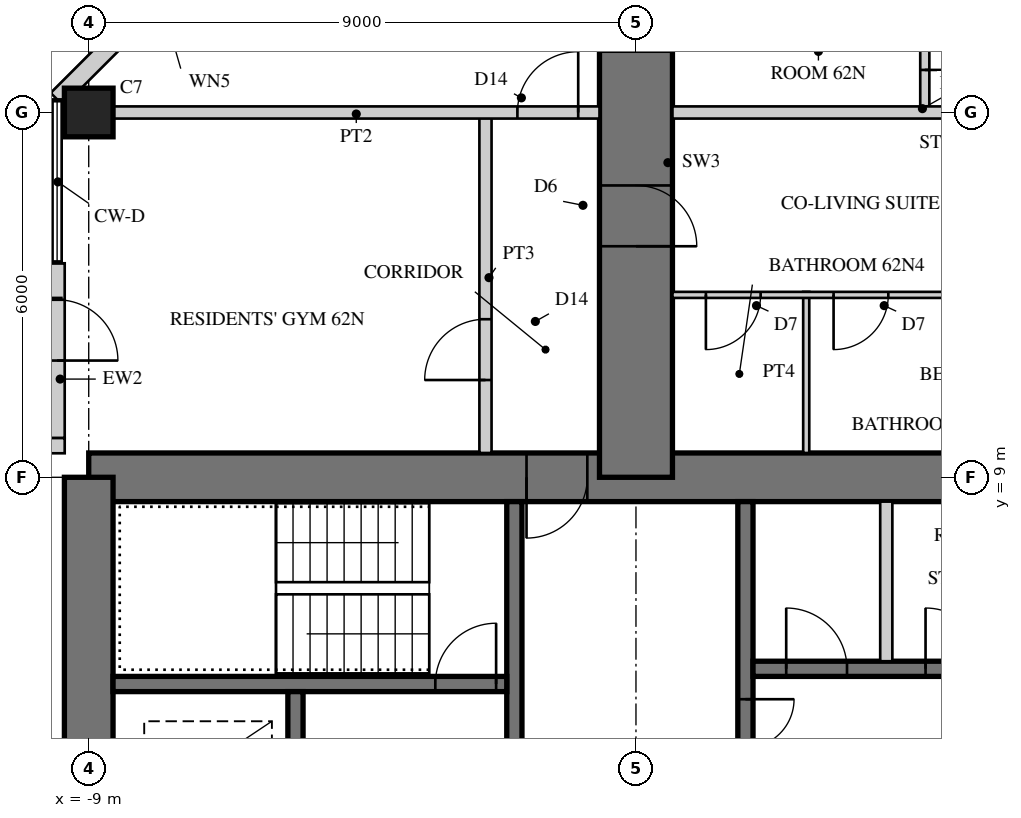
"""IFC4 building model, lengths in metres.
Left out: names, types, materials, properties, quantities, classifications, styles, units other than length and angle.
Written with IfcOpenShell. Run it as: python <this file> out.ifc"""

import sys

from ifc_helpers import new_model, si_unit, direction, frame, frame_2d, origin, origin_2d, place, context, subcontext, project, spatial, rectangle, hollow_rectangle, extrude, element, fill, save


model = new_model("IFC4")
c1 = context("Model", 3, precision=1e-05, world=origin(), true_north=direction((0.0, 1.0)))
c2 = subcontext(c1, "Body", "Model", "MODEL_VIEW")
j1 = project(units=[si_unit("LENGTHUNIT", "METRE"), si_unit("PLANEANGLEUNIT", "RADIAN")], contexts=[c1])
p1 = place(None, origin())
s1 = spatial("IfcSite", under=j1, at=p1, CompositionType="ELEMENT")
p2 = place(p1, origin())
s2 = spatial("IfcBuilding", under=s1, at=p2, CompositionType="ELEMENT")
p3 = place(p2, frame((0.0, 0.0, 242.5)))
s3 = spatial("IfcBuildingStorey", under=s2, at=p3, CompositionType="ELEMENT", Elevation=242.5)
p4 = place(p3, frame((9.0, 9.0, 0.0), z_axis=(0.0, 0.0, 1.0), x_axis=(-1.0, 0.0, 0.0)))
e1 = element("IfcWall", 1, at=p4, inside=s3, PredefinedType="SHEAR", context=c2, shape_type="SweptSolid", body=[
    extrude(rectangle(XDim=18.0, YDim=0.8, at=frame_2d((9.0, 0.0))), origin(), (0.0, 0.0, 1.0), 3.4),
])
p5 = place(p4, frame((9.8, 0.0, 0.0)))
e2 = element("IfcOpeningElement", 2, at=p5, cuts=e1, PredefinedType="OPENING", context=c2, shape_type="SweptSolid", body=[
    extrude(rectangle(XDim=1.0, YDim=2.4, at=frame_2d((0.5, 1.2))), frame((0.0, 0.41, 0.0), z_axis=(0.0, -1.0, 0.0), x_axis=(1.0, 0.0, 0.0)), (0.0, 0.0, 1.0), 0.82),
])
p6 = place(p3, frame((-9.0, 9.0, 0.0), z_axis=(0.0, 0.0, 1.0), x_axis=(0.0, -1.0, 0.0)))
e3 = element("IfcWall", 3, at=p6, inside=s3, PredefinedType="SHEAR", context=c2, shape_type="SweptSolid", body=[
    extrude(rectangle(XDim=18.0, YDim=0.8, at=frame_2d((9.0, 0.0))), origin(), (0.0, 0.0, 1.0), 3.4),
])
p7 = place(p6, frame((9.8, 0.0, 0.0)))
e4 = element("IfcOpeningElement", 4, at=p7, cuts=e3, PredefinedType="OPENING", context=c2, shape_type="SweptSolid", body=[
    extrude(rectangle(XDim=1.0, YDim=2.4, at=frame_2d((0.5, 1.2))), frame((0.0, 0.41, 0.0), z_axis=(0.0, -1.0, 0.0), x_axis=(1.0, 0.0, 0.0)), (0.0, 0.0, 1.0), 0.82),
])
p8 = place(p3, frame((1.8, 1.875, 0.0), z_axis=(0.0, 0.0, 1.0), x_axis=(0.0, 1.0, 0.0)))
e5 = element("IfcWall", 5, at=p8, inside=s3, PredefinedType="SHEAR", context=c2, shape_type="SweptSolid", body=[
    extrude(rectangle(XDim=6.725, YDim=0.25, at=frame_2d((3.363, 0.0))), origin(), (0.0, 0.0, 1.0), 3.4),
])
p9 = place(p8, frame((1.875, 0.0, 0.0)))
e6 = element("IfcOpeningElement", 6, at=p9, cuts=e5, PredefinedType="OPENING", context=c2, shape_type="SweptSolid", body=[
    extrude(rectangle(XDim=1.6, YDim=2.4, at=frame_2d((0.8, 1.2))), frame((0.0, 0.135, 0.0), z_axis=(0.0, -1.0, 0.0), x_axis=(1.0, 0.0, 0.0)), (0.0, 0.0, 1.0), 0.27),
])
p10 = place(p3, frame((1.925, 5.85, 0.0), z_axis=(0.0, 0.0, 1.0), x_axis=(1.0, 0.0, 0.0)))
e7 = element("IfcWall", 7, at=p10, inside=s3, PredefinedType="SHEAR", context=c2, shape_type="SweptSolid", body=[
    extrude(rectangle(XDim=6.675, YDim=0.25, at=frame_2d((3.337, 0.0))), origin(), (0.0, 0.0, 1.0), 3.4),
])
p11 = place(p10, frame((0.546, 0.0, 0.0)))
e8 = element("IfcOpeningElement", 8, at=p11, cuts=e7, PredefinedType="OPENING", context=c2, shape_type="SweptSolid", body=[
    extrude(rectangle(XDim=1.0, YDim=2.1, at=frame_2d((0.5, 1.05))), frame((0.0, 0.135, 0.0), z_axis=(0.0, -1.0, 0.0), x_axis=(1.0, 0.0, 0.0)), (0.0, 0.0, 1.0), 0.27),
])
p12 = place(p10, frame((2.837, 0.0, 0.0)))
e9 = element("IfcOpeningElement", 9, at=p12, cuts=e7, PredefinedType="OPENING", context=c2, shape_type="SweptSolid", body=[
    extrude(rectangle(XDim=1.0, YDim=2.1, at=frame_2d((0.5, 1.05))), frame((0.0, 0.135, 0.0), z_axis=(0.0, -1.0, 0.0), x_axis=(1.0, 0.0, 0.0)), (0.0, 0.0, 1.0), 0.27),
])
p13 = place(p3, frame((4.117, 5.975, 0.0), z_axis=(0.0, 0.0, 1.0), x_axis=(0.0, 1.0, 0.0)))
e10 = element("IfcWall", 10, at=p13, inside=s3, PredefinedType="PARTITIONING", context=c2, shape_type="SweptSolid", body=[
    extrude(rectangle(XDim=2.625, YDim=0.2, at=frame_2d((1.312, 0.0))), origin(), (0.0, 0.0, 1.0), 3.4),
])
p14 = place(p3, frame((-2.0, 1.675, 0.0), z_axis=(0.0, 0.0, 1.0), x_axis=(0.0, 1.0, 0.0)))
e11 = element("IfcWall", 11, at=p14, inside=s3, PredefinedType="SHEAR", context=c2, shape_type="SweptSolid", body=[
    extrude(rectangle(XDim=6.925, YDim=0.25, at=frame_2d((3.462, 0.0))), origin(), (0.0, 0.0, 1.0), 3.4),
])
p15 = place(p14, frame((0.725, 0.0, 0.0)))
e12 = element("IfcOpeningElement", 12, at=p15, cuts=e11, PredefinedType="OPENING", context=c2, shape_type="SweptSolid", body=[
    extrude(rectangle(XDim=1.0, YDim=2.1, at=frame_2d((0.5, 1.05))), frame((0.0, 0.135, 0.0), z_axis=(0.0, -1.0, 0.0), x_axis=(1.0, 0.0, 0.0)), (0.0, 0.0, 1.0), 0.27),
])
p16 = place(p3, frame((-2.125, 5.6, 0.0), z_axis=(0.0, 0.0, 1.0), x_axis=(-1.0, 0.0, 0.0)))
e13 = element("IfcWall", 13, at=p16, inside=s3, PredefinedType="SHEAR", context=c2, shape_type="SweptSolid", body=[
    extrude(rectangle(XDim=6.475, YDim=0.25, at=frame_2d((3.238, 0.0))), origin(), (0.0, 0.0, 1.0), 3.4),
])
p17 = place(p16, frame((0.175, 0.0, 0.0)))
e14 = element("IfcOpeningElement", 14, at=p17, cuts=e13, PredefinedType="OPENING", context=c2, shape_type="SweptSolid", body=[
    extrude(rectangle(XDim=1.0, YDim=2.1, at=frame_2d((0.5, 1.05))), frame((0.0, 0.135, 0.0), z_axis=(0.0, -1.0, 0.0), x_axis=(1.0, 0.0, 0.0)), (0.0, 0.0, 1.0), 0.27),
])
p18 = place(p3, frame((-5.6, 1.925, 0.0), z_axis=(0.0, 0.0, 1.0), x_axis=(0.0, 1.0, 0.0)))
e15 = element("IfcWall", 15, at=p18, inside=s3, PredefinedType="SHEAR", context=c2, shape_type="SweptSolid", body=[
    extrude(rectangle(XDim=3.55, YDim=0.25, at=frame_2d((1.775, 0.0))), origin(), (0.0, 0.0, 1.0), 3.4),
])
p19 = place(p18, frame((1.525, 0.0, 0.0)))
e16 = element("IfcOpeningElement", 16, at=p19, cuts=e15, PredefinedType="OPENING", context=c2, shape_type="SweptSolid", body=[
    extrude(rectangle(XDim=1.1, YDim=2.2, at=frame_2d((0.55, 1.1))), frame((0.0, 0.135, 0.0), z_axis=(0.0, -1.0, 0.0), x_axis=(1.0, 0.0, 0.0)), (0.0, 0.0, 1.0), 0.27),
])
p20 = place(p18, frame((0.075, 0.0, 0.0)))
e17 = element("IfcOpeningElement", 17, at=p20, cuts=e15, PredefinedType="OPENING", context=c2, shape_type="SweptSolid", body=[
    extrude(rectangle(XDim=0.8, YDim=2.1, at=frame_2d((0.4, 1.05))), frame((0.0, 0.135, 0.0), z_axis=(0.0, -1.0, 0.0), x_axis=(1.0, 0.0, 0.0)), (0.0, 0.0, 1.0), 0.27),
])
p21 = place(p3, frame((0.0, 9.0, 0.0), z_axis=(0.0, 0.0, 1.0), x_axis=(0.0, 1.0, 0.0)))
e18 = element("IfcWall", 18, at=p21, inside=s3, PredefinedType="SHEAR", context=c2, shape_type="SweptSolid", body=[
    extrude(rectangle(XDim=9.0, YDim=1.2, at=frame_2d((4.5, 0.0))), origin(), (0.0, 0.0, 1.0), 3.4),
])
p22 = place(p21, frame((3.8, 0.0, 0.0)))
e19 = element("IfcOpeningElement", 19, at=p22, cuts=e18, PredefinedType="OPENING", context=c2, shape_type="SweptSolid", body=[
    extrude(rectangle(XDim=1.0, YDim=2.15, at=frame_2d((0.5, 1.075))), frame((0.0, 0.61, 0.0), z_axis=(0.0, -1.0, 0.0), x_axis=(1.0, 0.0, 0.0)), (0.0, 0.0, 1.0), 1.22),
])
p23 = place(p21, frame((7.0, 0.0, 0.0)))
e20 = element("IfcOpeningElement", 20, at=p23, cuts=e18, PredefinedType="OPENING", context=c2, shape_type="SweptSolid", body=[
    extrude(rectangle(XDim=1.0, YDim=2.2, at=frame_2d((0.5, 1.1))), frame((0.0, 0.61, 0.0), z_axis=(0.0, -1.0, 0.0), x_axis=(1.0, 0.0, 0.0)), (0.0, 0.0, 1.0), 1.22),
])
p24 = place(p3, frame((-9.0, 15.0, 0.0), z_axis=(0.0, 0.0, 1.0), x_axis=(1.0, 0.0, 0.0)))
e21 = element("IfcColumn", 21, at=p24, inside=s3, PredefinedType="COLUMN", context=c2, shape_type="SweptSolid", body=[
    extrude(rectangle(XDim=0.8, YDim=0.8, at=origin_2d()), origin(), (0.0, 0.0, 1.0), 3.4),
])
p25 = place(p3, frame((-6.135, 18.6, 0.0), z_axis=(0.0, 0.0, 1.0), x_axis=(-0.707081278264, -0.707132283189, 0.0)))
e22 = element("IfcWall", 22, at=p25, inside=s3, PredefinedType="SOLIDWALL", context=c2, shape_type="SweptSolid", body=[
    extrude(rectangle(XDim=4.787, YDim=0.3, at=frame_2d((2.393, 0.0))), origin(), (0.0, 0.0, 1.0), 3.22),
])
p26 = place(p25, frame((1.943, 0.0, 0.3)))
e23 = element("IfcOpeningElement", 23, at=p26, cuts=e22, PredefinedType="OPENING", context=c2, shape_type="SweptSolid", body=[
    extrude(rectangle(XDim=0.9, YDim=2.4, at=frame_2d((0.45, 1.2))), frame((0.0, 0.16, 0.0), z_axis=(0.0, -1.0, 0.0), x_axis=(1.0, 0.0, 0.0)), (0.0, 0.0, 1.0), 0.32),
])
p27 = place(p3, frame((-9.52, 12.52, 0.0), z_axis=(0.0, 0.0, 1.0), x_axis=(0.0, -1.0, 0.0)))
e24 = element("IfcWall", 24, at=p27, inside=s3, PredefinedType="SOLIDWALL", context=c2, shape_type="SweptSolid", body=[
    extrude(rectangle(XDim=2.875, YDim=0.25, at=frame_2d((1.438, 0.0))), origin(), (0.0, 0.0, 1.0), 3.22),
])
p28 = place(p27, frame((0.6, 0.0, 0.0)))
e25 = element("IfcOpeningElement", 25, at=p28, cuts=e24, PredefinedType="OPENING", context=c2, shape_type="SweptSolid", body=[
    extrude(rectangle(XDim=1.0, YDim=2.2, at=frame_2d((0.5, 1.1))), frame((0.0, 0.135, 0.0), z_axis=(0.0, -1.0, 0.0), x_axis=(1.0, 0.0, 0.0)), (0.0, 0.0, 1.0), 0.27),
])
p29 = place(p3, frame((-9.395, 9.52, 0.0), z_axis=(0.0, 0.0, 1.0), x_axis=(-1.0, 0.0, 0.0)))
e26 = element("IfcWall", 26, at=p29, inside=s3, PredefinedType="SOLIDWALL", context=c2, shape_type="SweptSolid", body=[
    extrude(rectangle(XDim=3.125, YDim=0.25, at=frame_2d((1.562, 0.0))), origin(), (0.0, 0.0, 1.0), 3.22),
])
p30 = place(p29, frame((0.6, 0.0, 0.0)))
e27 = element("IfcOpeningElement", 27, at=p30, cuts=e26, PredefinedType="OPENING", context=c2, shape_type="SweptSolid", body=[
    extrude(rectangle(XDim=1.0, YDim=2.2, at=frame_2d((0.5, 1.1))), frame((0.0, 0.135, 0.0), z_axis=(0.0, -1.0, 0.0), x_axis=(1.0, 0.0, 0.0)), (0.0, 0.0, 1.0), 0.27),
])
p31 = place(p3, frame((2.8, 9.4, 0.0), z_axis=(0.0, 0.0, 1.0), x_axis=(0.0, 1.0, 0.0)))
e28 = element("IfcWall", 28, at=p31, inside=s3, PredefinedType="PARTITIONING", context=c2, shape_type="SweptSolid", body=[
    extrude(rectangle(XDim=2.65, YDim=0.1, at=frame_2d((1.325, 0.0))), origin(), (0.0, 0.0, 1.0), 3.22),
])
p32 = place(p3, frame((9.395, 12.0, 0.0), z_axis=(0.0, 0.0, 1.0), x_axis=(-1.0, 0.0, 0.0)))
e29 = element("IfcWall", 29, at=p32, inside=s3, PredefinedType="PARTITIONING", context=c2, shape_type="SweptSolid", body=[
    extrude(rectangle(XDim=8.795, YDim=0.1, at=frame_2d((4.397, 0.0))), origin(), (0.0, 0.0, 1.0), 3.22),
])
p33 = place(p32, frame((5.245, 0.0, 0.0)))
e30 = element("IfcOpeningElement", 30, at=p33, cuts=e29, PredefinedType="OPENING", context=c2, shape_type="SweptSolid", body=[
    extrude(rectangle(XDim=0.9, YDim=2.1, at=frame_2d((0.45, 1.05))), frame((0.0, 0.06, 0.0), z_axis=(0.0, -1.0, 0.0), x_axis=(1.0, 0.0, 0.0)), (0.0, 0.0, 1.0), 0.12),
])
p34 = place(p32, frame((7.345, 0.0, 0.0)))
e31 = element("IfcOpeningElement", 31, at=p34, cuts=e29, PredefinedType="OPENING", context=c2, shape_type="SweptSolid", body=[
    extrude(rectangle(XDim=0.9, YDim=2.1, at=frame_2d((0.45, 1.05))), frame((0.0, 0.06, 0.0), z_axis=(0.0, -1.0, 0.0), x_axis=(1.0, 0.0, 0.0)), (0.0, 0.0, 1.0), 0.12),
])
p35 = place(p3, frame((-2.475, 9.4, 0.0), z_axis=(0.0, 0.0, 1.0), x_axis=(0.0, 1.0, 0.0)))
e32 = element("IfcWall", 32, at=p35, inside=s3, PredefinedType="SOLIDWALL", context=c2, shape_type="SweptSolid", body=[
    extrude(rectangle(XDim=5.6, YDim=0.2, at=frame_2d((2.8, 0.0))), origin(), (0.0, 0.0, 1.0), 3.22),
])
p36 = place(p35, frame((1.2, 0.0, 0.0)))
e33 = element("IfcOpeningElement", 33, at=p36, cuts=e32, PredefinedType="OPENING", context=c2, shape_type="SweptSolid", body=[
    extrude(rectangle(XDim=1.0, YDim=2.2, at=frame_2d((0.5, 1.1))), frame((0.0, 0.11, 0.0), z_axis=(0.0, -1.0, 0.0), x_axis=(1.0, 0.0, 0.0)), (0.0, 0.0, 1.0), 0.22),
])
p37 = place(p3, frame((4.75, 15.1, 0.0), z_axis=(0.0, 0.0, 1.0), x_axis=(0.0, 1.0, 0.0)))
e34 = element("IfcWall", 34, at=p37, inside=s3, PredefinedType="PARTITIONING", context=c2, shape_type="SweptSolid", body=[
    extrude(rectangle(XDim=2.5, YDim=0.15, at=frame_2d((1.25, 0.0))), origin(), (0.0, 0.0, 1.0), 3.22),
])
p38 = place(p37, frame((0.6, 0.0, 0.0)))
e35 = element("IfcOpeningElement", 35, at=p38, cuts=e34, PredefinedType="OPENING", context=c2, shape_type="SweptSolid", body=[
    extrude(rectangle(XDim=1.0, YDim=2.1, at=frame_2d((0.5, 1.05))), frame((0.0, 0.085, 0.0), z_axis=(0.0, -1.0, 0.0), x_axis=(1.0, 0.0, 0.0)), (0.0, 0.0, 1.0), 0.17),
])
p39 = place(p3, frame((8.6, 15.0, 0.0), z_axis=(0.0, 0.0, 1.0), x_axis=(-1.0, 0.0, 0.0)))
e36 = element("IfcWall", 36, at=p39, inside=s3, PredefinedType="SOLIDWALL", context=c2, shape_type="SweptSolid", body=[
    extrude(rectangle(XDim=8.0, YDim=0.2, at=frame_2d((4.0, 0.0))), origin(), (0.0, 0.0, 1.0), 2.52),
])
p40 = place(p3, frame((-0.6, 15.0, 0.0), z_axis=(0.0, 0.0, 1.0), x_axis=(-1.0, 0.0, 0.0)))
e37 = element("IfcWall", 37, at=p40, inside=s3, PredefinedType="SOLIDWALL", context=c2, shape_type="SweptSolid", body=[
    extrude(rectangle(XDim=8.0, YDim=0.2, at=frame_2d((4.0, 0.0))), origin(), (0.0, 0.0, 1.0), 2.52),
])
p41 = place(p40, frame((0.35, 0.0, 0.0)))
e38 = element("IfcOpeningElement", 38, at=p41, cuts=e37, PredefinedType="OPENING", context=c2, shape_type="SweptSolid", body=[
    extrude(rectangle(XDim=1.0, YDim=2.2, at=frame_2d((0.5, 1.1))), frame((0.0, 0.11, 0.0), z_axis=(0.0, -1.0, 0.0), x_axis=(1.0, 0.0, 0.0)), (0.0, 0.0, 1.0), 0.22),
])
p42 = place(p28, origin())
e39 = element("IfcDoor", 39, at=p42, inside=s3, OperationType="SINGLE_SWING_RIGHT", PredefinedType="DOOR", context=c2, shape_type="SweptSolid", body=[
    extrude(hollow_rectangle(XDim=1.0, YDim=2.2, WallThickness=0.06, at=frame_2d((0.5, 1.1))), frame((0.0, 0.025, 0.0), z_axis=(0.0, -1.0, 0.0), x_axis=(1.0, 0.0, 0.0)), (0.0, 0.0, 1.0), 0.05),
    extrude(rectangle(XDim=0.879, YDim=2.079, at=frame_2d((0.5, 1.1))), frame((0.0, 0.025, 0.0), z_axis=(0.0, -1.0, 0.0), x_axis=(1.0, 0.0, 0.0)), (0.0, 0.0, 1.0), 0.05),
])
fill(e25, e39)
p43 = place(p33, origin())
e40 = element("IfcDoor", 40, at=p43, inside=s3, OperationType="SINGLE_SWING_RIGHT", PredefinedType="DOOR", context=c2, shape_type="SweptSolid", body=[
    extrude(rectangle(XDim=0.9, YDim=2.1, at=frame_2d((0.45, 1.05))), frame((0.0, 0.025, 0.0), z_axis=(0.0, -1.0, 0.0), x_axis=(1.0, 0.0, 0.0)), (0.0, 0.0, 1.0), 0.05),
])
fill(e30, e40)
p44 = place(p34, origin())
e41 = element("IfcDoor", 41, at=p44, inside=s3, OperationType="SINGLE_SWING_RIGHT", PredefinedType="DOOR", context=c2, shape_type="SweptSolid", body=[
    extrude(rectangle(XDim=0.9, YDim=2.1, at=frame_2d((0.45, 1.05))), frame((0.0, 0.025, 0.0), z_axis=(0.0, -1.0, 0.0), x_axis=(1.0, 0.0, 0.0)), (0.0, 0.0, 1.0), 0.05),
])
fill(e31, e41)
p45 = place(p36, origin())
e42 = element("IfcDoor", 42, at=p45, inside=s3, OperationType="SINGLE_SWING_LEFT", PredefinedType="DOOR", context=c2, shape_type="SweptSolid", body=[
    extrude(rectangle(XDim=1.0, YDim=2.2, at=frame_2d((0.5, 1.1))), frame((0.0, 0.025, 0.0), z_axis=(0.0, -1.0, 0.0), x_axis=(1.0, 0.0, 0.0)), (0.0, 0.0, 1.0), 0.05),
])
fill(e33, e42)
p46 = place(p38, frame((1.0, 0.0, 0.0), z_axis=(0.0, 0.0, 1.0), x_axis=(-1.0, 0.0, 0.0)))
e43 = element("IfcDoor", 43, at=p46, inside=s3, OperationType="SINGLE_SWING_RIGHT", PredefinedType="DOOR", context=c2, shape_type="SweptSolid", body=[
    extrude(rectangle(XDim=1.0, YDim=2.1, at=frame_2d((0.5, 1.05))), frame((0.0, 0.025, 0.0), z_axis=(0.0, -1.0, 0.0), x_axis=(1.0, 0.0, 0.0)), (0.0, 0.0, 1.0), 0.05),
])
fill(e35, e43)
p47 = place(p41, frame((1.0, 0.0, 0.0), z_axis=(0.0, 0.0, 1.0), x_axis=(-1.0, 0.0, 0.0)))
e44 = element("IfcDoor", 44, at=p47, inside=s3, OperationType="SINGLE_SWING_RIGHT", PredefinedType="DOOR", context=c2, shape_type="SweptSolid", body=[
    extrude(rectangle(XDim=1.0, YDim=2.2, at=frame_2d((0.5, 1.1))), frame((0.0, 0.025, 0.0), z_axis=(0.0, -1.0, 0.0), x_axis=(1.0, 0.0, 0.0)), (0.0, 0.0, 1.0), 0.05),
])
fill(e38, e44)
p48 = place(p22, frame((1.0, 0.0, 0.0), z_axis=(0.0, 0.0, 1.0), x_axis=(-1.0, 0.0, 0.0)))
e45 = element("IfcDoor", 45, at=p48, inside=s3, OperationType="SINGLE_SWING_RIGHT", PredefinedType="DOOR", context=c2, shape_type="SweptSolid", body=[
    extrude(rectangle(XDim=1.0, YDim=2.15, at=frame_2d((0.5, 1.075))), frame((0.0, 0.025, 0.0), z_axis=(0.0, -1.0, 0.0), x_axis=(1.0, 0.0, 0.0)), (0.0, 0.0, 1.0), 0.05),
])
fill(e19, e45)
p49 = place(p5, origin())
e46 = element("IfcDoor", 46, at=p49, inside=s3, OperationType="SINGLE_SWING_RIGHT", PredefinedType="DOOR", context=c2, shape_type="SweptSolid", body=[
    extrude(rectangle(XDim=1.0, YDim=2.4, at=frame_2d((0.5, 1.2))), frame((0.0, 0.055, 0.0), z_axis=(0.0, -1.0, 0.0), x_axis=(1.0, 0.0, 0.0)), (0.0, 0.0, 1.0), 0.05),
])
fill(e2, e46)
p50 = place(p9, frame((1.6, 0.0, 0.0), z_axis=(0.0, 0.0, 1.0), x_axis=(-1.0, 0.0, 0.0)))
e47 = element("IfcDoor", 47, at=p50, inside=s3, OperationType="DOUBLE_DOOR_SINGLE_SWING", PredefinedType="DOOR", context=c2, shape_type="SweptSolid", body=[
    extrude(rectangle(XDim=1.6, YDim=2.4, at=frame_2d((0.8, 1.2))), frame((0.0, 0.025, 0.0), z_axis=(0.0, -1.0, 0.0), x_axis=(1.0, 0.0, 0.0)), (0.0, 0.0, 1.0), 0.05),
])
fill(e6, e47)
p51 = place(p17, frame((1.0, 0.0, 0.0), z_axis=(0.0, 0.0, 1.0), x_axis=(-1.0, 0.0, 0.0)))
e48 = element("IfcDoor", 48, at=p51, inside=s3, OperationType="SINGLE_SWING_RIGHT", PredefinedType="DOOR", context=c2, shape_type="SweptSolid", body=[
    extrude(rectangle(XDim=1.0, YDim=2.1, at=frame_2d((0.5, 1.05))), frame((0.0, 0.025, 0.0), z_axis=(0.0, -1.0, 0.0), x_axis=(1.0, 0.0, 0.0)), (0.0, 0.0, 1.0), 0.05),
])
fill(e14, e48)
p52 = place(p11, origin())
e49 = element("IfcDoor", 49, at=p52, inside=s3, OperationType="SINGLE_SWING_LEFT", PredefinedType="DOOR", context=c2, shape_type="SweptSolid", body=[
    extrude(rectangle(XDim=1.0, YDim=2.1, at=frame_2d((0.5, 1.05))), frame((0.0, 0.025, 0.0), z_axis=(0.0, -1.0, 0.0), x_axis=(1.0, 0.0, 0.0)), (0.0, 0.0, 1.0), 0.05),
])
fill(e8, e49)
p53 = place(p12, origin())
e50 = element("IfcDoor", 50, at=p53, inside=s3, OperationType="SINGLE_SWING_LEFT", PredefinedType="DOOR", context=c2, shape_type="SweptSolid", body=[
    extrude(rectangle(XDim=1.0, YDim=2.1, at=frame_2d((0.5, 1.05))), frame((0.0, 0.025, 0.0), z_axis=(0.0, -1.0, 0.0), x_axis=(1.0, 0.0, 0.0)), (0.0, 0.0, 1.0), 0.05),
])
fill(e9, e50)
save(model, sys.argv[1])
